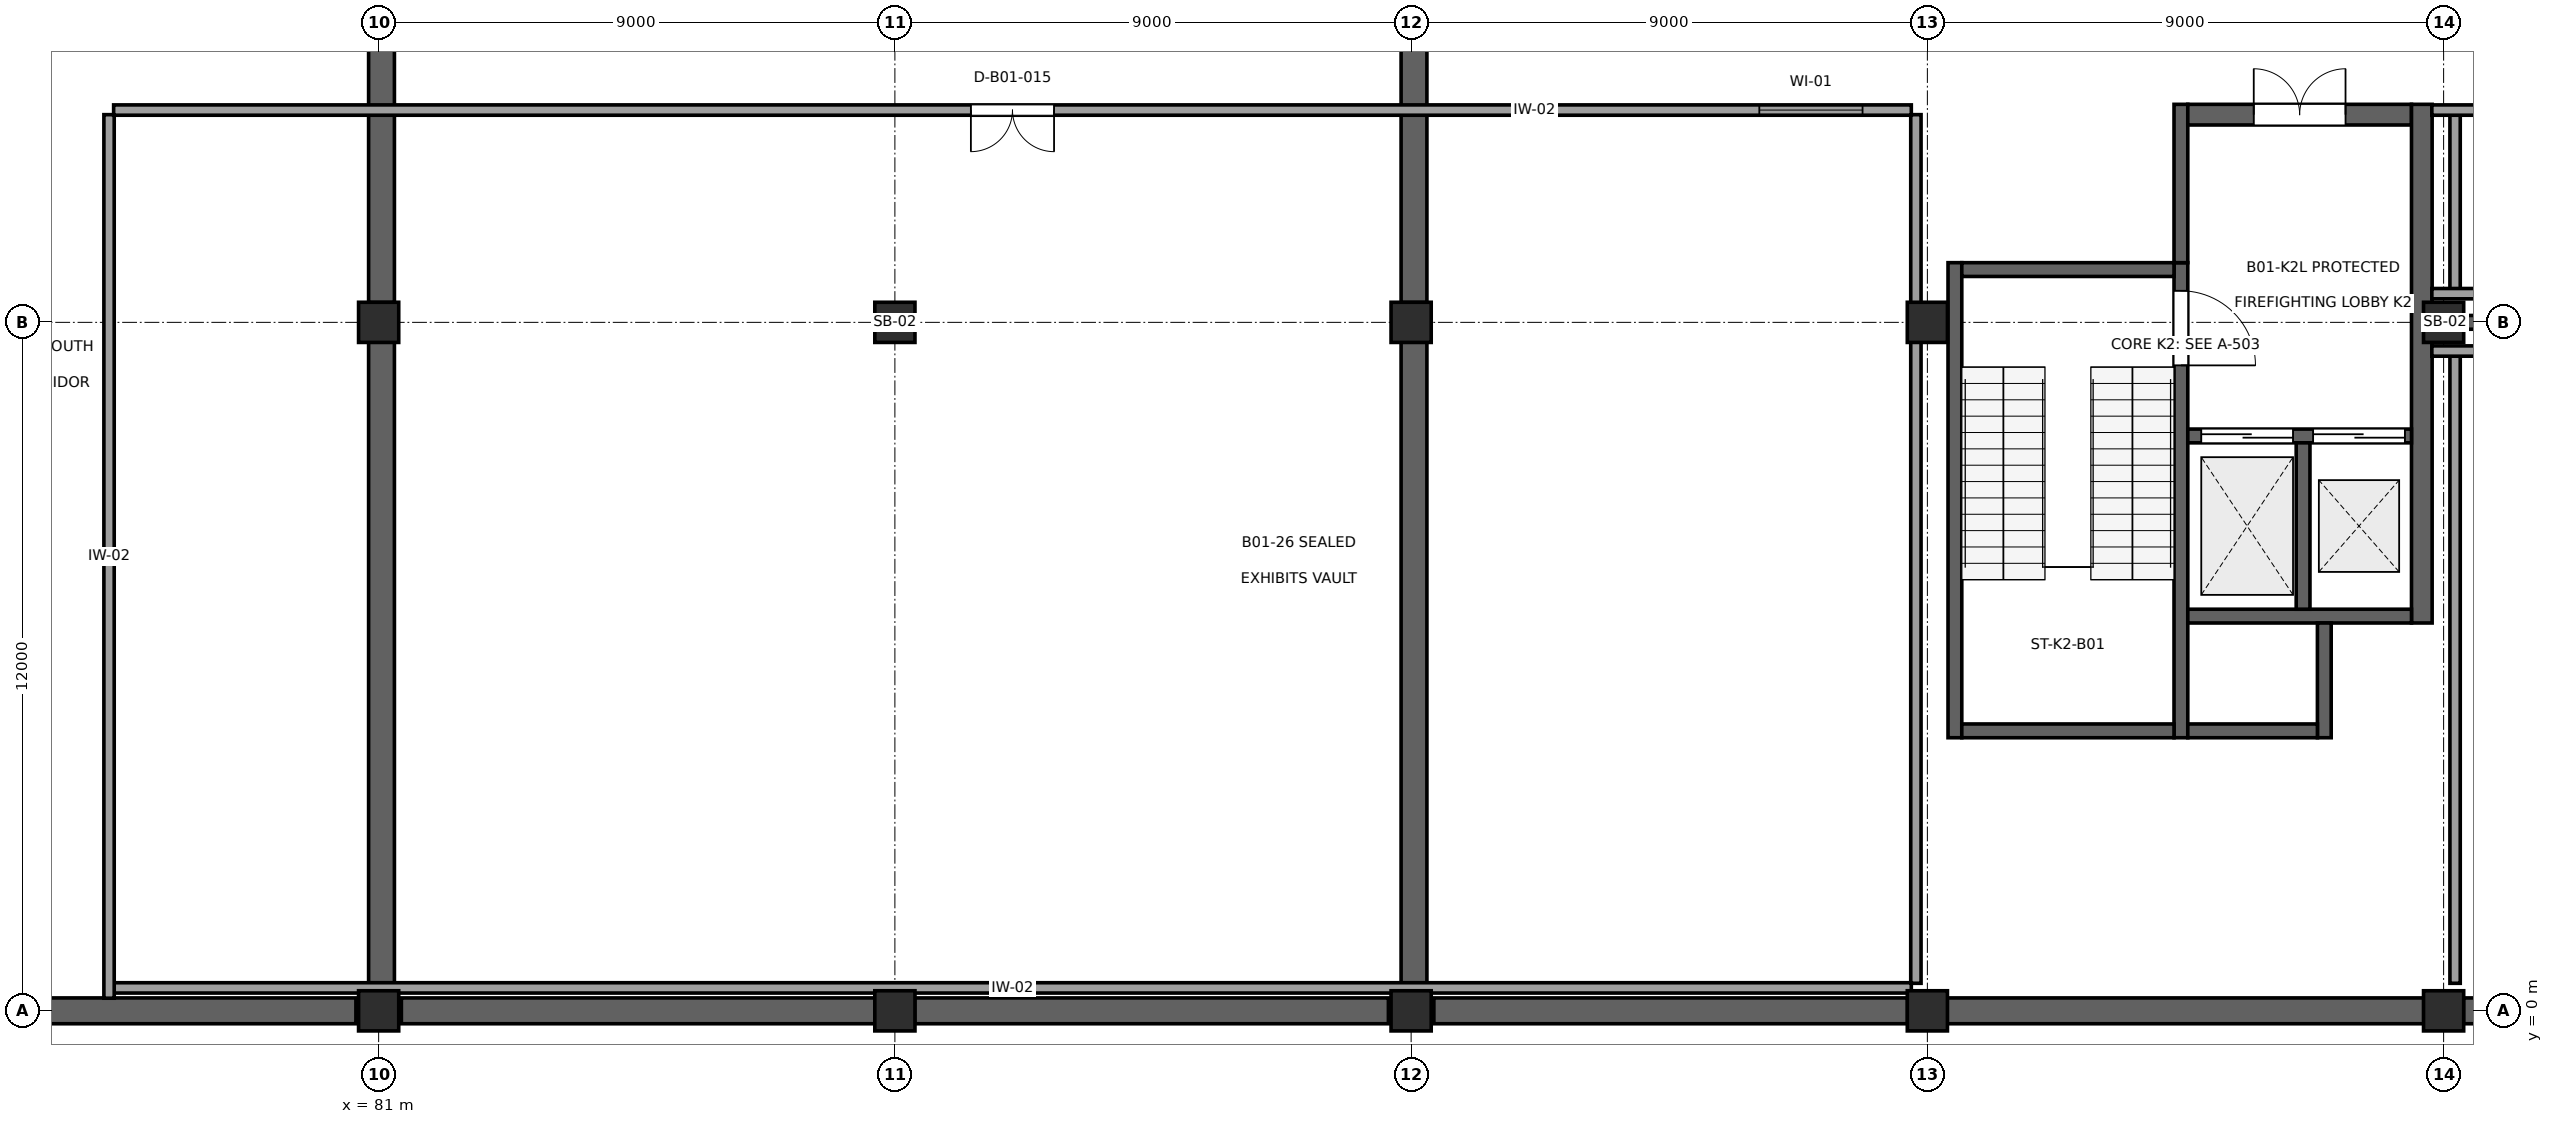
"""IFC4 building model, lengths in metres.
Left out: names, types, materials, properties, quantities, classifications, styles, units other than length and angle.
Written with IfcOpenShell. Run it as: python <this file> out.ifc"""

import sys

from ifc_helpers import new_model, si_unit, direction, frame, frame_2d, origin, origin_2d, place, context, subcontext, project, spatial, rectangle, extrude, element, fill, save


model = new_model("IFC4")
c1 = context("Model", 3, precision=1e-05, world=origin(), true_north=direction((0.0, 1.0)))
c2 = subcontext(c1, "Body", "Model", "MODEL_VIEW")
j1 = project(units=[si_unit("LENGTHUNIT", "METRE"), si_unit("PLANEANGLEUNIT", "RADIAN")], contexts=[c1])
p1 = place(None, origin())
s1 = spatial("IfcSite", under=j1, at=p1, CompositionType="ELEMENT")
p2 = place(p1, origin())
s2 = spatial("IfcBuilding", under=s1, at=p2, CompositionType="ELEMENT")
p3 = place(p2, frame((0.0, 0.0, -4.5)))
s3 = spatial("IfcBuildingStorey", under=s2, at=p3, CompositionType="ELEMENT", Elevation=-4.5)
for number, where, z_axis, x_axis in (
    (1, (81.0, 0.0, 0.0), (0.0, 0.0, 1.0), (1.0, 0.0, 0.0)),
    (2, (81.0, 12.0, 0.0), (0.0, 0.0, 1.0), (1.0, 0.0, 0.0)),
    (3, (90.0, 0.0, 0.0), (0.0, 0.0, 1.0), (1.0, 0.0, 0.0)),
    (4, (90.0, 12.0, 0.0), (0.0, 0.0, 1.0), (1.0, 0.0, 0.0)),
    (5, (99.0, 0.0, 0.0), (0.0, 0.0, 1.0), (1.0, 0.0, 0.0)),
    (6, (99.0, 12.0, 0.0), (0.0, 0.0, 1.0), (1.0, 0.0, 0.0)),
    (7, (108.0, 0.0, 0.0), (0.0, 0.0, 1.0), (1.0, 0.0, 0.0)),
    (8, (108.0, 12.0, 0.0), (0.0, 0.0, 1.0), (1.0, 0.0, 0.0)),
    (9, (117.0, 0.0, 0.0), (0.0, 0.0, 1.0), (1.0, 0.0, 0.0)),
    (10, (117.0, 12.0, 0.0), (0.0, 0.0, 1.0), (1.0, 0.0, 0.0)),
):
    element("IfcColumn", number, at=place(p3, frame(where, z_axis=z_axis, x_axis=x_axis)), inside=s3, PredefinedType="COLUMN", context=c2, shape_type="SweptSolid", body=[
        extrude(rectangle(XDim=0.7, YDim=0.7, at=origin_2d()), origin(), (0.0, 0.0, 1.0), 4.5),
    ])
p4 = place(p3, frame((99.396, 0.0, 0.0), z_axis=(0.0, 0.0, 1.0), x_axis=(1.0, 0.0, 0.0)))
e11 = element("IfcWall", 11, at=p4, inside=s3, PredefinedType="USERDEFINED", context=c2, shape_type="SweptSolid", body=[
    extrude(rectangle(XDim=8.258, YDim=0.45, at=frame_2d((4.129, 0.0))), origin(), (0.0, 0.0, 1.0), 4.32),
])
for number, where, z_axis, x_axis in (
    (12, (108.346, 0.0, 0.0), (0.0, 0.0, 1.0), (1.0, 0.0, 0.0)),
    (13, (117.346, 0.0, 0.0), (0.0, 0.0, 1.0), (1.0, 0.0, 0.0)),
):
    element("IfcWall", number, at=place(p3, frame(where, z_axis=z_axis, x_axis=x_axis)), inside=s3, PredefinedType="USERDEFINED", context=c2, shape_type="SweptSolid", body=[
        extrude(rectangle(XDim=8.308, YDim=0.45, at=frame_2d((4.154, 0.0))), origin(), (0.0, 0.0, 1.0), 4.32),
    ])
p5 = place(p3, frame((99.05, 23.654, 0.0), z_axis=(0.0, 0.0, 1.0), x_axis=(0.0, -1.0, 0.0)))
e14 = element("IfcWall", 14, at=p5, inside=s3, PredefinedType="USERDEFINED", context=c2, shape_type="SweptSolid", body=[
    extrude(rectangle(XDim=11.308, YDim=0.45, at=frame_2d((5.654, 0.0))), origin(), (0.0, 0.0, 1.0), 4.32),
])
p6 = place(p3, frame((99.05, 11.654, 0.0), z_axis=(0.0, 0.0, 1.0), x_axis=(0.0, -1.0, 0.0)))
e15 = element("IfcWall", 15, at=p6, inside=s3, PredefinedType="USERDEFINED", context=c2, shape_type="SweptSolid", body=[
    extrude(rectangle(XDim=11.308, YDim=0.45, at=frame_2d((5.654, 0.0))), origin(), (0.0, 0.0, 1.0), 4.32),
])
for number, where, z_axis, x_axis in (
    (16, (81.396, 0.0, 0.0), (0.0, 0.0, 1.0), (1.0, 0.0, 0.0)),
    (17, (90.346, 0.0, 0.0), (0.0, 0.0, 1.0), (1.0, 0.0, 0.0)),
):
    element("IfcWall", number, at=place(p3, frame(where, z_axis=z_axis, x_axis=x_axis)), inside=s3, PredefinedType="USERDEFINED", context=c2, shape_type="SweptSolid", body=[
        extrude(rectangle(XDim=8.258, YDim=0.45, at=frame_2d((4.129, 0.0))), origin(), (0.0, 0.0, 1.0), 4.32),
    ])
p7 = place(p3, frame((81.05, 23.654, 0.0), z_axis=(0.0, 0.0, 1.0), x_axis=(0.0, -1.0, 0.0)))
e18 = element("IfcWall", 18, at=p7, inside=s3, PredefinedType="USERDEFINED", context=c2, shape_type="SweptSolid", body=[
    extrude(rectangle(XDim=11.308, YDim=0.45, at=frame_2d((5.654, 0.0))), origin(), (0.0, 0.0, 1.0), 4.32),
])
p8 = place(p3, frame((81.05, 11.654, 0.0), z_axis=(0.0, 0.0, 1.0), x_axis=(0.0, -1.0, 0.0)))
e19 = element("IfcWall", 19, at=p8, inside=s3, PredefinedType="USERDEFINED", context=c2, shape_type="SweptSolid", body=[
    extrude(rectangle(XDim=11.308, YDim=0.45, at=frame_2d((5.654, 0.0))), origin(), (0.0, 0.0, 1.0), 4.32),
])
p9 = place(p3, frame((72.346, 0.0, 0.0), z_axis=(0.0, 0.0, 1.0), x_axis=(1.0, 0.0, 0.0)))
e20 = element("IfcWall", 20, at=p9, inside=s3, PredefinedType="USERDEFINED", context=c2, shape_type="SweptSolid", body=[
    extrude(rectangle(XDim=8.258, YDim=0.45, at=frame_2d((4.129, 0.0))), origin(), (0.0, 0.0, 1.0), 4.32),
])
p10 = place(p3, frame((108.48, 4.76, 0.0), z_axis=(0.0, 0.0, 1.0), x_axis=(0.0, 1.0, 0.0)))
e21 = element("IfcWall", 21, at=p10, inside=s3, PredefinedType="SHEAR", context=c2, shape_type="SweptSolid", body=[
    extrude(rectangle(XDim=8.28, YDim=0.24, at=frame_2d((4.14, 0.0))), origin(), (0.0, 0.0, 1.0), 4.31),
])
p11 = place(p3, frame((112.42, 4.76, 0.0), z_axis=(0.0, 0.0, 1.0), x_axis=(0.0, 1.0, 0.0)))
e22 = element("IfcWall", 22, at=p11, inside=s3, PredefinedType="SHEAR", context=c2, shape_type="SweptSolid", body=[
    extrude(rectangle(XDim=8.28, YDim=0.24, at=frame_2d((4.14, 0.0))), origin(), (0.0, 0.0, 1.0), 4.31),
])
p12 = place(p11, frame((6.49, 0.0, 0.0)))
e23 = element("IfcOpeningElement", 23, at=p12, cuts=e22, PredefinedType="OPENING", context=c2, shape_type="SweptSolid", body=[
    extrude(rectangle(XDim=1.3, YDim=2.2, at=frame_2d((0.65, 1.1))), frame((0.0, 0.135, 0.0), z_axis=(0.0, -1.0, 0.0), x_axis=(1.0, 0.0, 0.0)), (0.0, 0.0, 1.0), 0.27),
])
for number, where, z_axis, x_axis in (
    (24, (108.6, 4.88, 0.0), (0.0, 0.0, 1.0), (1.0, 0.0, 0.0)),
    (25, (108.6, 12.92, 0.0), (0.0, 0.0, 1.0), (1.0, 0.0, 0.0)),
):
    element("IfcWall", number, at=place(p3, frame(where, z_axis=z_axis, x_axis=x_axis)), inside=s3, PredefinedType="SHEAR", context=c2, shape_type="SweptSolid", body=[
        extrude(rectangle(XDim=3.7, YDim=0.24, at=frame_2d((1.85, 0.0))), origin(), (0.0, 0.0, 1.0), 4.31),
    ])
p13 = place(p3, frame((112.42, 13.04, 0.0), z_axis=(0.0, 0.0, 1.0), x_axis=(0.0, 1.0, 0.0)))
e26 = element("IfcWall", 26, at=p13, inside=s3, PredefinedType="SHEAR", context=c2, shape_type="SweptSolid", body=[
    extrude(rectangle(XDim=2.76, YDim=0.24, at=frame_2d((1.38, 0.0))), origin(), (0.0, 0.0, 1.0), 4.16),
])
p14 = place(p3, frame((112.54, 15.62, 0.0), z_axis=(0.0, 0.0, 1.0), x_axis=(1.0, 0.0, 0.0)))
e27 = element("IfcWall", 27, at=p14, inside=s3, PredefinedType="SHEAR", context=c2, shape_type="SweptSolid", body=[
    extrude(rectangle(XDim=3.9, YDim=0.36, at=frame_2d((1.95, 0.0))), origin(), (0.0, 0.0, 1.0), 4.16),
])
p15 = place(p14, frame((1.15, 0.0, 0.0)))
e28 = element("IfcOpeningElement", 28, at=p15, cuts=e27, PredefinedType="OPENING", context=c2, shape_type="SweptSolid", body=[
    extrude(rectangle(XDim=1.6, YDim=2.25, at=frame_2d((0.8, 1.125))), frame((0.0, 0.195, 0.0), z_axis=(0.0, -1.0, 0.0), x_axis=(1.0, 0.0, 0.0)), (0.0, 0.0, 1.0), 0.39),
])
p16 = place(p3, frame((116.62, 6.76, 0.0), z_axis=(0.0, 0.0, 1.0), x_axis=(0.0, 1.0, 0.0)))
e29 = element("IfcWall", 29, at=p16, inside=s3, PredefinedType="SHEAR", context=c2, shape_type="SweptSolid", body=[
    extrude(rectangle(XDim=9.04, YDim=0.36, at=frame_2d((4.52, 0.0))), origin(), (0.0, 0.0, 1.0), 4.16),
])
p17 = place(p3, frame((112.54, 10.02, 0.0), z_axis=(0.0, 0.0, 1.0), x_axis=(1.0, 0.0, 0.0)))
e30 = element("IfcWall", 30, at=p17, inside=s3, PredefinedType="SHEAR", context=c2, shape_type="SweptSolid", body=[
    extrude(rectangle(XDim=3.9, YDim=0.24, at=frame_2d((1.95, 0.0))), origin(), (0.0, 0.0, 1.0), 4.31),
])
p18 = place(p17, frame((0.235, 0.0, 0.0)))
e31 = element("IfcOpeningElement", 31, at=p18, cuts=e30, PredefinedType="OPENING", context=c2, shape_type="SweptSolid", body=[
    extrude(rectangle(XDim=1.6, YDim=2.3, at=frame_2d((0.8, 1.15))), frame((0.0, 0.135, 0.0), z_axis=(0.0, -1.0, 0.0), x_axis=(1.0, 0.0, 0.0)), (0.0, 0.0, 1.0), 0.27),
])
p19 = place(p17, frame((2.185, 0.0, 0.0)))
e32 = element("IfcOpeningElement", 32, at=p19, cuts=e30, PredefinedType="OPENING", context=c2, shape_type="SweptSolid", body=[
    extrude(rectangle(XDim=1.6, YDim=2.3, at=frame_2d((0.8, 1.15))), frame((0.0, 0.135, 0.0), z_axis=(0.0, -1.0, 0.0), x_axis=(1.0, 0.0, 0.0)), (0.0, 0.0, 1.0), 0.27),
])
p20 = place(p3, frame((112.54, 6.88, 0.0), z_axis=(0.0, 0.0, 1.0), x_axis=(1.0, 0.0, 0.0)))
e33 = element("IfcWall", 33, at=p20, inside=s3, PredefinedType="SHEAR", context=c2, shape_type="SweptSolid", body=[
    extrude(rectangle(XDim=3.9, YDim=0.24, at=frame_2d((1.95, 0.0))), origin(), (0.0, 0.0, 1.0), 4.31),
])
p21 = place(p3, frame((114.55, 7.0, 0.0), z_axis=(0.0, 0.0, 1.0), x_axis=(0.0, 1.0, 0.0)))
e34 = element("IfcWall", 34, at=p21, inside=s3, PredefinedType="SHEAR", context=c2, shape_type="SweptSolid", body=[
    extrude(rectangle(XDim=2.9, YDim=0.24, at=frame_2d((1.45, 0.0))), origin(), (0.0, 0.0, 1.0), 4.31),
])
p22 = place(p3, frame((114.92, 4.76, 0.0), z_axis=(0.0, 0.0, 1.0), x_axis=(0.0, 1.0, 0.0)))
e35 = element("IfcWall", 35, at=p22, inside=s3, PredefinedType="SHEAR", context=c2, shape_type="SweptSolid", body=[
    extrude(rectangle(XDim=2.0, YDim=0.24, at=frame_2d((1.0, 0.0))), origin(), (0.0, 0.0, 1.0), 4.31),
])
p23 = place(p3, frame((112.54, 4.88, 0.0), z_axis=(0.0, 0.0, 1.0), x_axis=(1.0, 0.0, 0.0)))
e36 = element("IfcWall", 36, at=p23, inside=s3, PredefinedType="SHEAR", context=c2, shape_type="SweptSolid", body=[
    extrude(rectangle(XDim=2.26, YDim=0.24, at=frame_2d((1.13, 0.0))), origin(), (0.0, 0.0, 1.0), 4.31),
])
p24 = place(p3, frame((117.346, 12.0, 0.0), z_axis=(0.0, 0.0, 1.0), x_axis=(1.0, 0.0, 0.0)))
e37 = element("IfcWall", 37, at=p24, inside=s3, PredefinedType="SHEAR", context=c2, shape_type="SweptSolid", body=[
    extrude(rectangle(XDim=8.308, YDim=0.24, at=frame_2d((4.154, 0.0))), origin(), (0.0, 0.0, 1.0), 3.685),
])
p25 = place(p3, frame((107.8, 15.62, 0.0), z_axis=(0.0, 0.0, 1.0), x_axis=(0.0, -1.0, 0.0)))
e38 = element("IfcWall", 38, at=p25, inside=s3, PredefinedType="PARTITIONING", context=c2, shape_type="SweptSolid", body=[
    extrude(rectangle(XDim=15.14, YDim=0.18, at=frame_2d((7.57, 0.0))), origin(), (0.0, 0.0, 1.0), 3.825),
])
p26 = place(p3, frame((107.72, 0.4, 0.0), z_axis=(0.0, 0.0, 1.0), x_axis=(-1.0, 0.0, 0.0)))
e39 = element("IfcWall", 39, at=p26, inside=s3, PredefinedType="PARTITIONING", context=c2, shape_type="SweptSolid", body=[
    extrude(rectangle(XDim=31.34, YDim=0.18, at=frame_2d((15.67, 0.0))), origin(), (0.0, 0.0, 1.0), 4.14),
])
p27 = place(p3, frame((76.3, 0.22, 0.0), z_axis=(0.0, 0.0, 1.0), x_axis=(0.0, 1.0, 0.0)))
e40 = element("IfcWall", 40, at=p27, inside=s3, PredefinedType="PARTITIONING", context=c2, shape_type="SweptSolid", body=[
    extrude(rectangle(XDim=15.4, YDim=0.18, at=frame_2d((7.7, 0.0))), origin(), (0.0, 0.0, 1.0), 4.14),
])
p28 = place(p3, frame((76.38, 15.7, 0.0), z_axis=(0.0, 0.0, 1.0), x_axis=(1.0, 0.0, 0.0)))
e41 = element("IfcWall", 41, at=p28, inside=s3, PredefinedType="PARTITIONING", context=c2, shape_type="SweptSolid", body=[
    extrude(rectangle(XDim=31.34, YDim=0.18, at=frame_2d((15.67, 0.0))), origin(), (0.0, 0.0, 1.0), 4.14),
])
p29 = place(p28, frame((14.945, 0.0, 0.0)))
e42 = element("IfcOpeningElement", 42, at=p29, cuts=e41, PredefinedType="OPENING", context=c2, shape_type="SweptSolid", body=[
    extrude(rectangle(XDim=1.45, YDim=2.3, at=frame_2d((0.725, 1.15))), frame((0.0, 0.105, 0.0), z_axis=(0.0, -1.0, 0.0), x_axis=(1.0, 0.0, 0.0)), (0.0, 0.0, 1.0), 0.21),
])
p30 = place(p28, frame((28.69, 0.0, 1.05)))
e43 = element("IfcOpeningElement", 43, at=p30, cuts=e41, PredefinedType="OPENING", context=c2, shape_type="SweptSolid", body=[
    extrude(rectangle(XDim=1.8, YDim=1.1, at=frame_2d((0.9, 0.55))), frame((0.0, 0.105, 0.0), z_axis=(0.0, -1.0, 0.0), x_axis=(1.0, 0.0, 0.0)), (0.0, 0.0, 1.0), 0.21),
])
p31 = place(p3, frame((117.2, 0.48, 0.0), z_axis=(0.0, 0.0, 1.0), x_axis=(0.0, 1.0, 0.0)))
e44 = element("IfcWall", 44, at=p31, inside=s3, PredefinedType="PARTITIONING", context=c2, shape_type="SweptSolid", body=[
    extrude(rectangle(XDim=10.94, YDim=0.18, at=frame_2d((5.47, 0.0))), origin(), (0.0, 0.0, 1.0), 3.785),
])
p32 = place(p3, frame((116.795, 11.5, 0.0), z_axis=(0.0, 0.0, 1.0), x_axis=(1.0, 0.0, 0.0)))
e45 = element("IfcWall", 45, at=p32, inside=s3, PredefinedType="PARTITIONING", context=c2, shape_type="SweptSolid", body=[
    extrude(rectangle(XDim=9.525, YDim=0.18, at=frame_2d((4.763, 0.0))), origin(), (0.0, 0.0, 1.0), 4.14),
])
p33 = place(p3, frame((117.2, 12.58, 0.0), z_axis=(0.0, 0.0, 1.0), x_axis=(0.0, 1.0, 0.0)))
e46 = element("IfcWall", 46, at=p33, inside=s3, PredefinedType="PARTITIONING", context=c2, shape_type="SweptSolid", body=[
    extrude(rectangle(XDim=3.04, YDim=0.18, at=frame_2d((1.52, 0.0))), origin(), (0.0, 0.0, 1.0), 3.785),
])
p34 = place(p3, frame((116.795, 15.7, 0.0), z_axis=(0.0, 0.0, 1.0), x_axis=(1.0, 0.0, 0.0)))
e47 = element("IfcWall", 47, at=p34, inside=s3, PredefinedType="PARTITIONING", context=c2, shape_type="SweptSolid", body=[
    extrude(rectangle(XDim=9.525, YDim=0.18, at=frame_2d((4.763, 0.0))), origin(), (0.0, 0.0, 1.0), 4.14),
])
p35 = place(p34, frame((4.288, 0.0, 0.0)))
e48 = element("IfcOpeningElement", 48, at=p35, cuts=e47, PredefinedType="OPENING", context=c2, shape_type="SweptSolid", body=[
    extrude(rectangle(XDim=0.95, YDim=2.1, at=frame_2d((0.475, 1.05))), frame((0.0, 0.105, 0.0), z_axis=(0.0, -1.0, 0.0), x_axis=(1.0, 0.0, 0.0)), (0.0, 0.0, 1.0), 0.21),
])
p36 = place(p34, frame((7.175, 0.0, 1.05)))
e49 = element("IfcOpeningElement", 49, at=p36, cuts=e47, PredefinedType="OPENING", context=c2, shape_type="SweptSolid", body=[
    extrude(rectangle(XDim=1.5, YDim=1.1, at=frame_2d((0.75, 0.55))), frame((0.0, 0.105, 0.0), z_axis=(0.0, -1.0, 0.0), x_axis=(1.0, 0.0, 0.0)), (0.0, 0.0, 1.0), 0.21),
])
p37 = place(p3, frame((126.32, 12.5, 0.0), z_axis=(0.0, 0.0, 1.0), x_axis=(-1.0, 0.0, 0.0)))
e50 = element("IfcWall", 50, at=p37, inside=s3, PredefinedType="PARTITIONING", context=c2, shape_type="SweptSolid", body=[
    extrude(rectangle(XDim=9.525, YDim=0.18, at=frame_2d((4.763, 0.0))), origin(), (0.0, 0.0, 1.0), 4.14),
])
p38 = place(p12, frame((1.3, 0.0, 0.0), z_axis=(0.0, 0.0, 1.0), x_axis=(-1.0, 0.0, 0.0)))
e51 = element("IfcDoor", 51, at=p38, inside=s3, OperationType="SINGLE_SWING_LEFT", PredefinedType="DOOR", context=c2, shape_type="SweptSolid", body=[
    extrude(rectangle(XDim=1.3, YDim=2.2, at=frame_2d((0.65, 1.1))), frame((0.0, 0.025, 0.0), z_axis=(0.0, -1.0, 0.0), x_axis=(1.0, 0.0, 0.0)), (0.0, 0.0, 1.0), 0.05),
])
fill(e23, e51)
p39 = place(p15, origin())
e52 = element("IfcDoor", 52, at=p39, inside=s3, OperationType="DOUBLE_DOOR_SINGLE_SWING", PredefinedType="DOOR", context=c2, shape_type="SweptSolid", body=[
    extrude(rectangle(XDim=1.6, YDim=2.25, at=frame_2d((0.8, 1.125))), frame((0.0, 0.025, 0.0), z_axis=(0.0, -1.0, 0.0), x_axis=(1.0, 0.0, 0.0)), (0.0, 0.0, 1.0), 0.05),
])
fill(e28, e52)
p40 = place(p18, origin())
e53 = element("IfcDoor", 53, at=p40, inside=s3, OperationType="DOUBLE_DOOR_SLIDING", PredefinedType="DOOR", context=c2, shape_type="SweptSolid", body=[
    extrude(rectangle(XDim=1.6, YDim=2.3, at=frame_2d((0.8, 1.15))), frame((0.0, 0.025, 0.0), z_axis=(0.0, -1.0, 0.0), x_axis=(1.0, 0.0, 0.0)), (0.0, 0.0, 1.0), 0.05),
])
fill(e31, e53)
p41 = place(p19, origin())
e54 = element("IfcDoor", 54, at=p41, inside=s3, OperationType="DOUBLE_DOOR_SLIDING", PredefinedType="DOOR", context=c2, shape_type="SweptSolid", body=[
    extrude(rectangle(XDim=1.6, YDim=2.3, at=frame_2d((0.8, 1.15))), frame((0.0, 0.025, 0.0), z_axis=(0.0, -1.0, 0.0), x_axis=(1.0, 0.0, 0.0)), (0.0, 0.0, 1.0), 0.05),
])
fill(e32, e54)
p42 = place(p29, frame((1.45, 0.0, 0.0), z_axis=(0.0, 0.0, 1.0), x_axis=(-1.0, 0.0, 0.0)))
e55 = element("IfcDoor", 55, at=p42, inside=s3, OperationType="DOUBLE_DOOR_SINGLE_SWING", PredefinedType="DOOR", context=c2, shape_type="SweptSolid", body=[
    extrude(rectangle(XDim=1.45, YDim=2.3, at=frame_2d((0.725, 1.15))), frame((0.0, 0.025, 0.0), z_axis=(0.0, -1.0, 0.0), x_axis=(1.0, 0.0, 0.0)), (0.0, 0.0, 1.0), 0.05),
])
fill(e42, e55)
p43 = place(p30, origin())
e56 = element("IfcWindow", 56, at=p43, inside=s3, PartitioningType="SINGLE_PANEL", PredefinedType="WINDOW", context=c2, shape_type="SweptSolid", body=[
    extrude(rectangle(XDim=1.8, YDim=1.1, at=frame_2d((0.9, 0.55))), frame((0.0, 0.03, 0.0), z_axis=(0.0, -1.0, 0.0), x_axis=(1.0, 0.0, 0.0)), (0.0, 0.0, 1.0), 0.06),
])
fill(e43, e56)
save(model, sys.argv[1])
